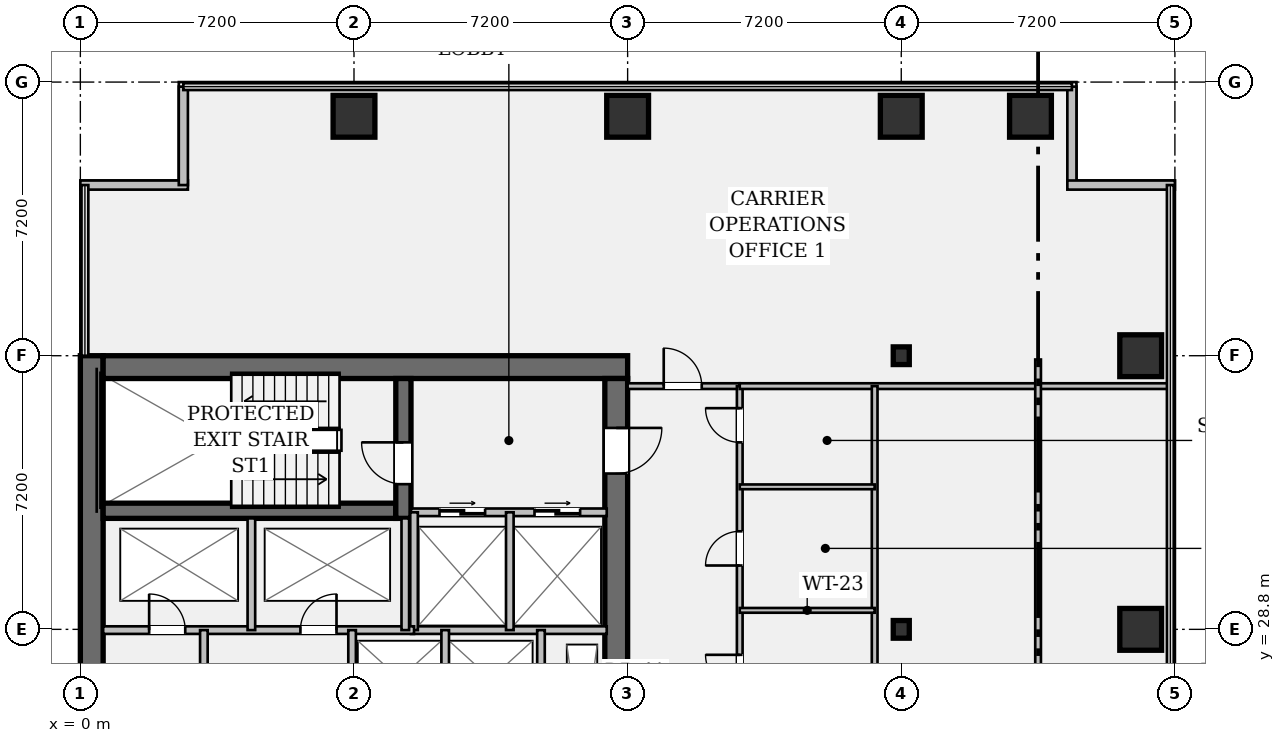
"""IFC4 building model, lengths in metres.
Left out: names, types, materials, properties, quantities, classifications, styles, units other than length and angle.
Written with IfcOpenShell. Run it as: python <this file> out.ifc"""

import sys

from ifc_helpers import new_model, si_unit, direction, frame, frame_2d, origin, origin_2d, place, context, subcontext, project, spatial, rectangle, hollow_rectangle, i_section, extrude, element, fill, save


model = new_model("IFC4")
c1 = context("Model", 3, precision=1e-05, world=origin(), true_north=direction((0.0, 1.0)))
c2 = subcontext(c1, "Body", "Model", "MODEL_VIEW")
j1 = project(units=[si_unit("LENGTHUNIT", "METRE"), si_unit("PLANEANGLEUNIT", "RADIAN")], contexts=[c1])
p1 = place(None, origin())
s1 = spatial("IfcSite", under=j1, at=p1, CompositionType="ELEMENT")
p2 = place(p1, origin())
s2 = spatial("IfcBuilding", under=s1, at=p2, CompositionType="ELEMENT")
p3 = place(p2, frame((0.0, 0.0, 31.15)))
s3 = spatial("IfcBuildingStorey", under=s2, at=p3, CompositionType="ELEMENT", Elevation=31.15)
p4 = place(p3, frame((0.3, 7.2, 0.0), z_axis=(0.0, 0.0, 1.0), x_axis=(0.0, 1.0, 0.0)))
e1 = element("IfcWall", 1, at=p4, inside=s3, PredefinedType="SHEAR", context=c2, shape_type="SweptSolid", body=[
    extrude(rectangle(XDim=28.8, YDim=0.6, at=frame_2d((14.4, 0.0))), origin(), (0.0, 0.0, 1.0), 3.57),
])
p5 = place(p3, frame((0.6, 35.7, 0.0), z_axis=(0.0, 0.0, 1.0), x_axis=(1.0, 0.0, 0.0)))
e2 = element("IfcWall", 2, at=p5, inside=s3, PredefinedType="SHEAR", context=c2, shape_type="SweptSolid", body=[
    extrude(rectangle(XDim=13.8, YDim=0.6, at=frame_2d((6.9, 0.0))), origin(), (0.0, 0.0, 1.0), 3.57),
])
p6 = place(p3, frame((14.1, 35.4, 0.0), z_axis=(0.0, 0.0, 1.0), x_axis=(0.0, -1.0, 0.0)))
e3 = element("IfcWall", 3, at=p6, inside=s3, PredefinedType="SHEAR", context=c2, shape_type="SweptSolid", body=[
    extrude(rectangle(XDim=27.6, YDim=0.6, at=frame_2d((13.8, 0.0))), origin(), (0.0, 0.0, 1.0), 3.57),
])
p7 = place(p6, frame((1.3, 0.0, 0.0)))
e4 = element("IfcOpeningElement", 4, at=p7, cuts=e3, PredefinedType="OPENING", context=c2, shape_type="SweptSolid", body=[
    extrude(rectangle(XDim=1.2, YDim=2.15, at=frame_2d((0.6, 1.075))), frame((0.0, 0.312, 0.0), z_axis=(0.0, -1.0, 0.0), x_axis=(1.0, 0.0, 0.0)), (0.0, 0.0, 1.0), 0.624),
])
p8 = place(p6, frame((25.25, 0.0, 0.0)))
e5 = element("IfcOpeningElement", 5, at=p8, cuts=e3, PredefinedType="OPENING", context=c2, shape_type="SweptSolid", body=[
    extrude(rectangle(XDim=1.2, YDim=2.15, at=frame_2d((0.6, 1.075))), frame((0.0, 0.312, 0.0), z_axis=(0.0, -1.0, 0.0), x_axis=(1.0, 0.0, 0.0)), (0.0, 0.0, 1.0), 0.624),
])
p9 = place(p6, frame((14.6, 0.0, 0.0)))
e6 = element("IfcOpeningElement", 6, at=p9, cuts=e3, PredefinedType="OPENING", context=c2, shape_type="SweptSolid", body=[
    extrude(rectangle(XDim=1.6, YDim=2.2, at=frame_2d((0.8, 1.1))), frame((0.0, 0.312, 0.0), z_axis=(0.0, -1.0, 0.0), x_axis=(1.0, 0.0, 0.0)), (0.0, 0.0, 1.0), 0.624),
])
p10 = place(p3, frame((0.6, 31.92, 0.0), z_axis=(0.0, 0.0, 1.0), x_axis=(1.0, 0.0, 0.0)))
e7 = element("IfcWall", 7, at=p10, inside=s3, PredefinedType="SHEAR", context=c2, shape_type="SweptSolid", body=[
    extrude(rectangle(XDim=7.7, YDim=0.4, at=frame_2d((3.85, 0.0))), origin(), (0.0, 0.0, 1.0), 3.57),
])
p11 = place(p3, frame((8.5, 31.72, 0.0), z_axis=(0.0, 0.0, 1.0), x_axis=(0.0, 1.0, 0.0)))
e8 = element("IfcWall", 8, at=p11, inside=s3, PredefinedType="SHEAR", context=c2, shape_type="SweptSolid", body=[
    extrude(rectangle(XDim=3.68, YDim=0.4, at=frame_2d((1.84, 0.0))), origin(), (0.0, 0.0, 1.0), 3.57),
])
p12 = place(p11, frame((0.9, 0.0, 0.0)))
e9 = element("IfcOpeningElement", 9, at=p12, cuts=e8, PredefinedType="OPENING", context=c2, shape_type="SweptSolid", body=[
    extrude(rectangle(XDim=1.1, YDim=2.15, at=frame_2d((0.55, 1.075))), frame((0.0, 0.212, 0.0), z_axis=(0.0, -1.0, 0.0), x_axis=(1.0, 0.0, 0.0)), (0.0, 0.0, 1.0), 0.424),
])
for number, where, z_axis, x_axis in (
    (10, (7.2, 42.3, 0.0), (0.0, 0.0, 1.0), (1.0, 0.0, 0.0)),
    (11, (14.4, 42.3, 0.0), (0.0, 0.0, 1.0), (1.0, 0.0, 0.0)),
):
    element("IfcColumn", number, at=place(p3, frame(where, z_axis=z_axis, x_axis=x_axis)), inside=s3, PredefinedType="COLUMN", context=c2, shape_type="SweptSolid", body=[
        extrude(hollow_rectangle(XDim=1.1, YDim=1.1, WallThickness=0.07, at=origin_2d()), origin(), (0.0, 0.0, 1.0), 3.57),
    ])
for number, where, z_axis, x_axis in (
    (12, (21.6, 28.8, 0.0), (0.0, 0.0, 1.0), (1.0, 0.0, 0.0)),
    (13, (21.6, 36.0, 0.0), (0.0, 0.0, 1.0), (1.0, 0.0, 0.0)),
):
    element("IfcColumn", number, at=place(p3, frame(where, z_axis=z_axis, x_axis=x_axis)), inside=s3, PredefinedType="COLUMN", context=c2, shape_type="SweptSolid", body=[
        extrude(i_section(OverallWidth=0.422, OverallDepth=0.465, WebThickness=0.045, FlangeThickness=0.073, FilletRadius=0.018, at=origin_2d()), origin(), (0.0, 0.0, 1.0), 3.57),
    ])
for number, where, z_axis, x_axis in (
    (14, (21.6, 42.3, 0.0), (0.0, 0.0, 1.0), (1.0, 0.0, 0.0)),
    (15, (25.0, 42.3, 0.0), (0.0, 0.0, 1.0), (1.0, 0.0, 0.0)),
    (16, (27.9, 28.8, 0.0), (0.0, 0.0, 1.0), (1.0, 0.0, 0.0)),
    (17, (27.9, 36.0, 0.0), (0.0, 0.0, 1.0), (1.0, 0.0, 0.0)),
):
    element("IfcColumn", number, at=place(p3, frame(where, z_axis=z_axis, x_axis=x_axis)), inside=s3, PredefinedType="COLUMN", context=c2, shape_type="SweptSolid", body=[
        extrude(hollow_rectangle(XDim=1.1, YDim=1.1, WallThickness=0.07, at=origin_2d()), origin(), (0.0, 0.0, 1.0), 3.57),
    ])
p13 = place(p3, frame((0.0, 40.49, 0.0), z_axis=(0.0, 0.0, 1.0), x_axis=(1.0, 0.0, 0.0)))
e18 = element("IfcWall", 18, at=p13, inside=s3, PredefinedType="STANDARD", context=c2, shape_type="SweptSolid", body=[
    extrude(rectangle(XDim=2.83, YDim=0.24, at=frame_2d((1.415, 0.0))), origin(), (0.0, 0.0, 1.0), 3.57),
])
for number, where, z_axis, x_axis in (
    (19, (2.71, 40.49, 0.0), (0.0, 0.0, 1.0), (0.0, 1.0, 0.0)),
    (20, (26.09, 43.08, 0.0), (0.0, 0.0, 1.0), (0.0, -1.0, 0.0)),
):
    element("IfcWall", number, at=place(p3, frame(where, z_axis=z_axis, x_axis=x_axis)), inside=s3, PredefinedType="STANDARD", context=c2, shape_type="SweptSolid", body=[
        extrude(rectangle(XDim=2.59, YDim=0.24, at=frame_2d((1.295, 0.0))), origin(), (0.0, 0.0, 1.0), 3.57),
    ])
p14 = place(p3, frame((25.97, 40.49, 0.0), z_axis=(0.0, 0.0, 1.0), x_axis=(1.0, 0.0, 0.0)))
e21 = element("IfcWall", 21, at=p14, inside=s3, PredefinedType="STANDARD", context=c2, shape_type="SweptSolid", body=[
    extrude(rectangle(XDim=2.83, YDim=0.24, at=frame_2d((1.415, 0.0))), origin(), (0.0, 0.0, 1.0), 3.57),
])
p15 = place(p3, frame((8.7, 31.88, 0.0), z_axis=(0.0, 0.0, 1.0), x_axis=(1.0, 0.0, 0.0)))
e22 = element("IfcWall", 22, at=p15, inside=s3, PredefinedType="PARTITIONING", context=c2, shape_type="SweptSolid", body=[
    extrude(rectangle(XDim=5.15, YDim=0.2, at=frame_2d((2.575, 0.0))), origin(), (0.0, 0.0, 1.0), 3.57),
])
p16 = place(p15, frame((0.75, 0.0, 0.0)))
e23 = element("IfcOpeningElement", 23, at=p16, cuts=e22, PredefinedType="OPENING", context=c2, shape_type="SweptSolid", body=[
    extrude(rectangle(XDim=1.2, YDim=2.2, at=frame_2d((0.6, 1.1))), frame((0.0, 0.112, 0.0), z_axis=(0.0, -1.0, 0.0), x_axis=(1.0, 0.0, 0.0)), (0.0, 0.0, 1.0), 0.224),
])
p17 = place(p15, frame((3.25, 0.0, 0.0)))
e24 = element("IfcOpeningElement", 24, at=p17, cuts=e22, PredefinedType="OPENING", context=c2, shape_type="SweptSolid", body=[
    extrude(rectangle(XDim=1.2, YDim=2.2, at=frame_2d((0.6, 1.1))), frame((0.0, 0.112, 0.0), z_axis=(0.0, -1.0, 0.0), x_axis=(1.0, 0.0, 0.0)), (0.0, 0.0, 1.0), 0.224),
])
p18 = place(p3, frame((8.7, 28.78, 0.0), z_axis=(0.0, 0.0, 1.0), x_axis=(1.0, 0.0, 0.0)))
e25 = element("IfcWall", 25, at=p18, inside=s3, PredefinedType="PARTITIONING", context=c2, shape_type="SweptSolid", body=[
    extrude(rectangle(XDim=5.15, YDim=0.2, at=frame_2d((2.575, 0.0))), origin(), (0.0, 0.0, 1.0), 3.57),
])
for number, where, z_axis, x_axis in (
    (26, (8.78, 28.78, 0.0), (0.0, 0.0, 1.0), (0.0, 1.0, 0.0)),
    (27, (11.3, 28.78, 0.0), (0.0, 0.0, 1.0), (0.0, 1.0, 0.0)),
):
    element("IfcWall", number, at=place(p3, frame(where, z_axis=z_axis, x_axis=x_axis)), inside=s3, PredefinedType="PARTITIONING", context=c2, shape_type="SweptSolid", body=[
        extrude(rectangle(XDim=3.1, YDim=0.2, at=frame_2d((1.55, 0.0))), origin(), (0.0, 0.0, 1.0), 3.57),
    ])
p19 = place(p3, frame((0.6, 28.78, 0.0), z_axis=(0.0, 0.0, 1.0), x_axis=(1.0, 0.0, 0.0)))
e28 = element("IfcWall", 28, at=p19, inside=s3, PredefinedType="PARTITIONING", context=c2, shape_type="SweptSolid", body=[
    extrude(rectangle(XDim=8.18, YDim=0.2, at=frame_2d((4.09, 0.0))), origin(), (0.0, 0.0, 1.0), 3.57),
])
p20 = place(p19, frame((1.21, 0.0, 0.0)))
e29 = element("IfcOpeningElement", 29, at=p20, cuts=e28, PredefinedType="OPENING", context=c2, shape_type="SweptSolid", body=[
    extrude(rectangle(XDim=0.95, YDim=2.15, at=frame_2d((0.475, 1.075))), frame((0.0, 0.112, 0.0), z_axis=(0.0, -1.0, 0.0), x_axis=(1.0, 0.0, 0.0)), (0.0, 0.0, 1.0), 0.224),
])
p21 = place(p19, frame((5.19, 0.0, 0.0)))
e30 = element("IfcOpeningElement", 30, at=p21, cuts=e28, PredefinedType="OPENING", context=c2, shape_type="SweptSolid", body=[
    extrude(rectangle(XDim=0.95, YDim=2.15, at=frame_2d((0.475, 1.075))), frame((0.0, 0.112, 0.0), z_axis=(0.0, -1.0, 0.0), x_axis=(1.0, 0.0, 0.0)), (0.0, 0.0, 1.0), 0.224),
])
for number, where, z_axis, x_axis in (
    (31, (4.5, 28.78, 0.0), (0.0, 0.0, 1.0), (0.0, 1.0, 0.0)),
    (32, (8.55, 28.78, 0.0), (0.0, 0.0, 1.0), (0.0, 1.0, 0.0)),
):
    element("IfcWall", number, at=place(p3, frame(where, z_axis=z_axis, x_axis=x_axis)), inside=s3, PredefinedType="PARTITIONING", context=c2, shape_type="SweptSolid", body=[
        extrude(rectangle(XDim=2.94, YDim=0.2, at=frame_2d((1.47, 0.0))), origin(), (0.0, 0.0, 1.0), 3.57),
    ])
p22 = place(p3, frame((3.25, 15.7, 0.0), z_axis=(0.0, 0.0, 1.0), x_axis=(0.0, 1.0, 0.0)))
e33 = element("IfcWall", 33, at=p22, inside=s3, PredefinedType="PARTITIONING", context=c2, shape_type="SweptSolid", body=[
    extrude(rectangle(XDim=13.08, YDim=0.2, at=frame_2d((6.54, 0.0))), origin(), (0.0, 0.0, 1.0), 3.57),
])
for number, where, z_axis, x_axis in (
    (34, (7.15, 26.4, 0.0), (0.0, 0.0, 1.0), (0.0, 1.0, 0.0)),
    (35, (9.6, 26.4, 0.0), (0.0, 0.0, 1.0), (0.0, 1.0, 0.0)),
):
    element("IfcWall", number, at=place(p3, frame(where, z_axis=z_axis, x_axis=x_axis)), inside=s3, PredefinedType="PARTITIONING", context=c2, shape_type="SweptSolid", body=[
        extrude(rectangle(XDim=2.38, YDim=0.2, at=frame_2d((1.19, 0.0))), origin(), (0.0, 0.0, 1.0), 3.57),
    ])
p23 = place(p3, frame((12.12, 22.2, 0.0), z_axis=(0.0, 0.0, 1.0), x_axis=(0.0, 1.0, 0.0)))
e36 = element("IfcWall", 36, at=p23, inside=s3, PredefinedType="PARTITIONING", context=c2, shape_type="SweptSolid", body=[
    extrude(rectangle(XDim=6.58, YDim=0.2, at=frame_2d((3.29, 0.0))), origin(), (0.0, 0.0, 1.0), 3.57),
])
p24 = place(p23, frame((2.75, 0.0, 0.0)))
e37 = element("IfcOpeningElement", 37, at=p24, cuts=e36, PredefinedType="OPENING", context=c2, shape_type="SweptSolid", body=[
    extrude(rectangle(XDim=0.85, YDim=2.15, at=frame_2d((0.425, 1.075))), frame((0.0, 0.112, 0.0), z_axis=(0.0, -1.0, 0.0), x_axis=(1.0, 0.0, 0.0)), (0.0, 0.0, 1.0), 0.224),
])
p25 = place(p3, frame((14.4, 35.2, 0.0), z_axis=(0.0, 0.0, 1.0), x_axis=(1.0, 0.0, 0.0)))
e38 = element("IfcWall", 38, at=p25, inside=s3, PredefinedType="PARTITIONING", context=c2, shape_type="SweptSolid", body=[
    extrude(rectangle(XDim=2.95, YDim=0.15, at=frame_2d((1.475, 0.0))), origin(), (0.0, 0.0, 1.0), 2.628),
])
p26 = place(p25, frame((0.95, 0.0, 0.0)))
e39 = element("IfcOpeningElement", 39, at=p26, cuts=e38, PredefinedType="OPENING", context=c2, shape_type="SweptSolid", body=[
    extrude(rectangle(XDim=1.0, YDim=2.15, at=frame_2d((0.5, 1.075))), frame((0.0, 0.087, 0.0), z_axis=(0.0, -1.0, 0.0), x_axis=(1.0, 0.0, 0.0)), (0.0, 0.0, 1.0), 0.174),
])
p27 = place(p3, frame((17.35, 13.0, 0.0), z_axis=(0.0, 0.0, 1.0), x_axis=(0.0, 1.0, 0.0)))
e40 = element("IfcWall", 40, at=p27, inside=s3, PredefinedType="PARTITIONING", context=c2, shape_type="SweptSolid", body=[
    extrude(rectangle(XDim=22.2, YDim=0.15, at=frame_2d((11.1, 0.0))), origin(), (0.0, 0.0, 1.0), 2.628),
])
p28 = place(p27, frame((10.98, 0.0, 0.0)))
e41 = element("IfcOpeningElement", 41, at=p28, cuts=e40, PredefinedType="OPENING", context=c2, shape_type="SweptSolid", body=[
    extrude(rectangle(XDim=0.9, YDim=2.15, at=frame_2d((0.45, 1.075))), frame((0.0, 0.087, 0.0), z_axis=(0.0, -1.0, 0.0), x_axis=(1.0, 0.0, 0.0)), (0.0, 0.0, 1.0), 0.174),
])
p29 = place(p27, frame((14.23, 0.0, 0.0)))
e42 = element("IfcOpeningElement", 42, at=p29, cuts=e40, PredefinedType="OPENING", context=c2, shape_type="SweptSolid", body=[
    extrude(rectangle(XDim=0.9, YDim=2.15, at=frame_2d((0.45, 1.075))), frame((0.0, 0.087, 0.0), z_axis=(0.0, -1.0, 0.0), x_axis=(1.0, 0.0, 0.0)), (0.0, 0.0, 1.0), 0.174),
])
p30 = place(p27, frame((17.48, 0.0, 0.0)))
e43 = element("IfcOpeningElement", 43, at=p30, cuts=e40, PredefinedType="OPENING", context=c2, shape_type="SweptSolid", body=[
    extrude(rectangle(XDim=0.9, YDim=2.15, at=frame_2d((0.45, 1.075))), frame((0.0, 0.087, 0.0), z_axis=(0.0, -1.0, 0.0), x_axis=(1.0, 0.0, 0.0)), (0.0, 0.0, 1.0), 0.174),
])
p31 = place(p27, frame((20.72, 0.0, 0.0)))
e44 = element("IfcOpeningElement", 44, at=p31, cuts=e40, PredefinedType="OPENING", context=c2, shape_type="SweptSolid", body=[
    extrude(rectangle(XDim=0.9, YDim=2.15, at=frame_2d((0.45, 1.075))), frame((0.0, 0.087, 0.0), z_axis=(0.0, -1.0, 0.0), x_axis=(1.0, 0.0, 0.0)), (0.0, 0.0, 1.0), 0.174),
])
p32 = place(p3, frame((17.35, 35.2, 0.0), z_axis=(0.0, 0.0, 1.0), x_axis=(1.0, 0.0, 0.0)))
e45 = element("IfcWall", 45, at=p32, inside=s3, PredefinedType="PARTITIONING", context=c2, shape_type="SweptSolid", body=[
    extrude(rectangle(XDim=11.33, YDim=0.15, at=frame_2d((5.665, 0.0))), origin(), (0.0, 0.0, 1.0), 2.628),
])
p33 = place(p3, frame((20.9, 22.7, 0.0), z_axis=(0.0, 0.0, 1.0), x_axis=(0.0, 1.0, 0.0)))
e46 = element("IfcWall", 46, at=p33, inside=s3, PredefinedType="PARTITIONING", context=c2, shape_type="SweptSolid", body=[
    extrude(rectangle(XDim=12.5, YDim=0.15, at=frame_2d((6.25, 0.0))), origin(), (0.0, 0.0, 1.0), 2.628),
])
for number, where, z_axis, x_axis in (
    (47, (17.35, 29.3, 0.0), (0.0, 0.0, 1.0), (1.0, 0.0, 0.0)),
    (48, (17.35, 32.55, 0.0), (0.0, 0.0, 1.0), (1.0, 0.0, 0.0)),
):
    element("IfcWall", number, at=place(p3, frame(where, z_axis=z_axis, x_axis=x_axis)), inside=s3, PredefinedType="PARTITIONING", context=c2, shape_type="SweptSolid", body=[
        extrude(rectangle(XDim=3.55, YDim=0.125, at=frame_2d((1.775, 0.0))), origin(), (0.0, 0.0, 1.0), 3.088),
    ])
p34 = place(p3, frame((25.2, 13.0, 0.0), z_axis=(0.0, 0.0, 1.0), x_axis=(0.0, 1.0, 0.0)))
e49 = element("IfcWall", 49, at=p34, inside=s3, PredefinedType="PARTITIONING", context=c2, shape_type="SweptSolid", body=[
    extrude(rectangle(XDim=22.9, YDim=0.15, at=frame_2d((11.45, 0.0))), origin(), (0.0, 0.0, 1.0), 2.628),
])
p35 = place(p12, origin())
e50 = element("IfcDoor", 50, at=p35, inside=s3, OperationType="SINGLE_SWING_RIGHT", PredefinedType="DOOR", context=c2, shape_type="SweptSolid", body=[
    extrude(rectangle(XDim=1.1, YDim=2.15, at=frame_2d((0.55, 1.075))), frame((0.0, 0.025, 0.0), z_axis=(0.0, -1.0, 0.0), x_axis=(1.0, 0.0, 0.0)), (0.0, 0.0, 1.0), 0.05),
])
fill(e9, e50)
p36 = place(p7, origin())
e51 = element("IfcDoor", 51, at=p36, inside=s3, OperationType="SINGLE_SWING_LEFT", PredefinedType="DOOR", context=c2, shape_type="SweptSolid", body=[
    extrude(rectangle(XDim=1.2, YDim=2.15, at=frame_2d((0.6, 1.075))), frame((0.0, 0.025, 0.0), z_axis=(0.0, -1.0, 0.0), x_axis=(1.0, 0.0, 0.0)), (0.0, 0.0, 1.0), 0.05),
])
fill(e4, e51)
p37 = place(p16, origin())
e52 = element("IfcDoor", 52, at=p37, inside=s3, OperationType="DOUBLE_DOOR_SLIDING", PredefinedType="DOOR", context=c2, shape_type="SweptSolid", body=[
    extrude(rectangle(XDim=1.2, YDim=2.2, at=frame_2d((0.6, 1.1))), frame((0.0, 0.025, 0.0), z_axis=(0.0, -1.0, 0.0), x_axis=(1.0, 0.0, 0.0)), (0.0, 0.0, 1.0), 0.05),
])
fill(e23, e52)
p38 = place(p17, origin())
e53 = element("IfcDoor", 53, at=p38, inside=s3, OperationType="DOUBLE_DOOR_SLIDING", PredefinedType="DOOR", context=c2, shape_type="SweptSolid", body=[
    extrude(rectangle(XDim=1.2, YDim=2.2, at=frame_2d((0.6, 1.1))), frame((0.0, 0.025, 0.0), z_axis=(0.0, -1.0, 0.0), x_axis=(1.0, 0.0, 0.0)), (0.0, 0.0, 1.0), 0.05),
])
fill(e24, e53)
p39 = place(p20, origin())
e54 = element("IfcDoor", 54, at=p39, inside=s3, OperationType="SINGLE_SWING_LEFT", PredefinedType="DOOR", context=c2, shape_type="SweptSolid", body=[
    extrude(rectangle(XDim=0.95, YDim=2.15, at=frame_2d((0.475, 1.075))), frame((0.0, 0.025, 0.0), z_axis=(0.0, -1.0, 0.0), x_axis=(1.0, 0.0, 0.0)), (0.0, 0.0, 1.0), 0.05),
])
fill(e29, e54)
p40 = place(p21, origin())
e55 = element("IfcDoor", 55, at=p40, inside=s3, OperationType="SINGLE_SWING_RIGHT", PredefinedType="DOOR", context=c2, shape_type="SweptSolid", body=[
    extrude(rectangle(XDim=0.95, YDim=2.15, at=frame_2d((0.475, 1.075))), frame((0.0, 0.025, 0.0), z_axis=(0.0, -1.0, 0.0), x_axis=(1.0, 0.0, 0.0)), (0.0, 0.0, 1.0), 0.05),
])
fill(e30, e55)
p41 = place(p26, origin())
e56 = element("IfcDoor", 56, at=p41, inside=s3, OperationType="SINGLE_SWING_LEFT", PredefinedType="DOOR", context=c2, shape_type="SweptSolid", body=[
    extrude(rectangle(XDim=1.0, YDim=2.15, at=frame_2d((0.5, 1.075))), frame((0.0, 0.025, 0.0), z_axis=(0.0, -1.0, 0.0), x_axis=(1.0, 0.0, 0.0)), (0.0, 0.0, 1.0), 0.05),
])
fill(e39, e56)
p42 = place(p29, origin())
e57 = element("IfcDoor", 57, at=p42, inside=s3, OperationType="SINGLE_SWING_RIGHT", PredefinedType="DOOR", context=c2, shape_type="SweptSolid", body=[
    extrude(rectangle(XDim=0.9, YDim=2.15, at=frame_2d((0.45, 1.075))), frame((0.0, 0.025, 0.0), z_axis=(0.0, -1.0, 0.0), x_axis=(1.0, 0.0, 0.0)), (0.0, 0.0, 1.0), 0.05),
])
fill(e42, e57)
p43 = place(p30, origin())
e58 = element("IfcDoor", 58, at=p43, inside=s3, OperationType="SINGLE_SWING_LEFT", PredefinedType="DOOR", context=c2, shape_type="SweptSolid", body=[
    extrude(rectangle(XDim=0.9, YDim=2.15, at=frame_2d((0.45, 1.075))), frame((0.0, 0.025, 0.0), z_axis=(0.0, -1.0, 0.0), x_axis=(1.0, 0.0, 0.0)), (0.0, 0.0, 1.0), 0.05),
])
fill(e43, e58)
p44 = place(p31, origin())
e59 = element("IfcDoor", 59, at=p44, inside=s3, OperationType="SINGLE_SWING_RIGHT", PredefinedType="DOOR", context=c2, shape_type="SweptSolid", body=[
    extrude(rectangle(XDim=0.9, YDim=2.15, at=frame_2d((0.45, 1.075))), frame((0.0, 0.025, 0.0), z_axis=(0.0, -1.0, 0.0), x_axis=(1.0, 0.0, 0.0)), (0.0, 0.0, 1.0), 0.05),
])
fill(e44, e59)
save(model, sys.argv[1])
